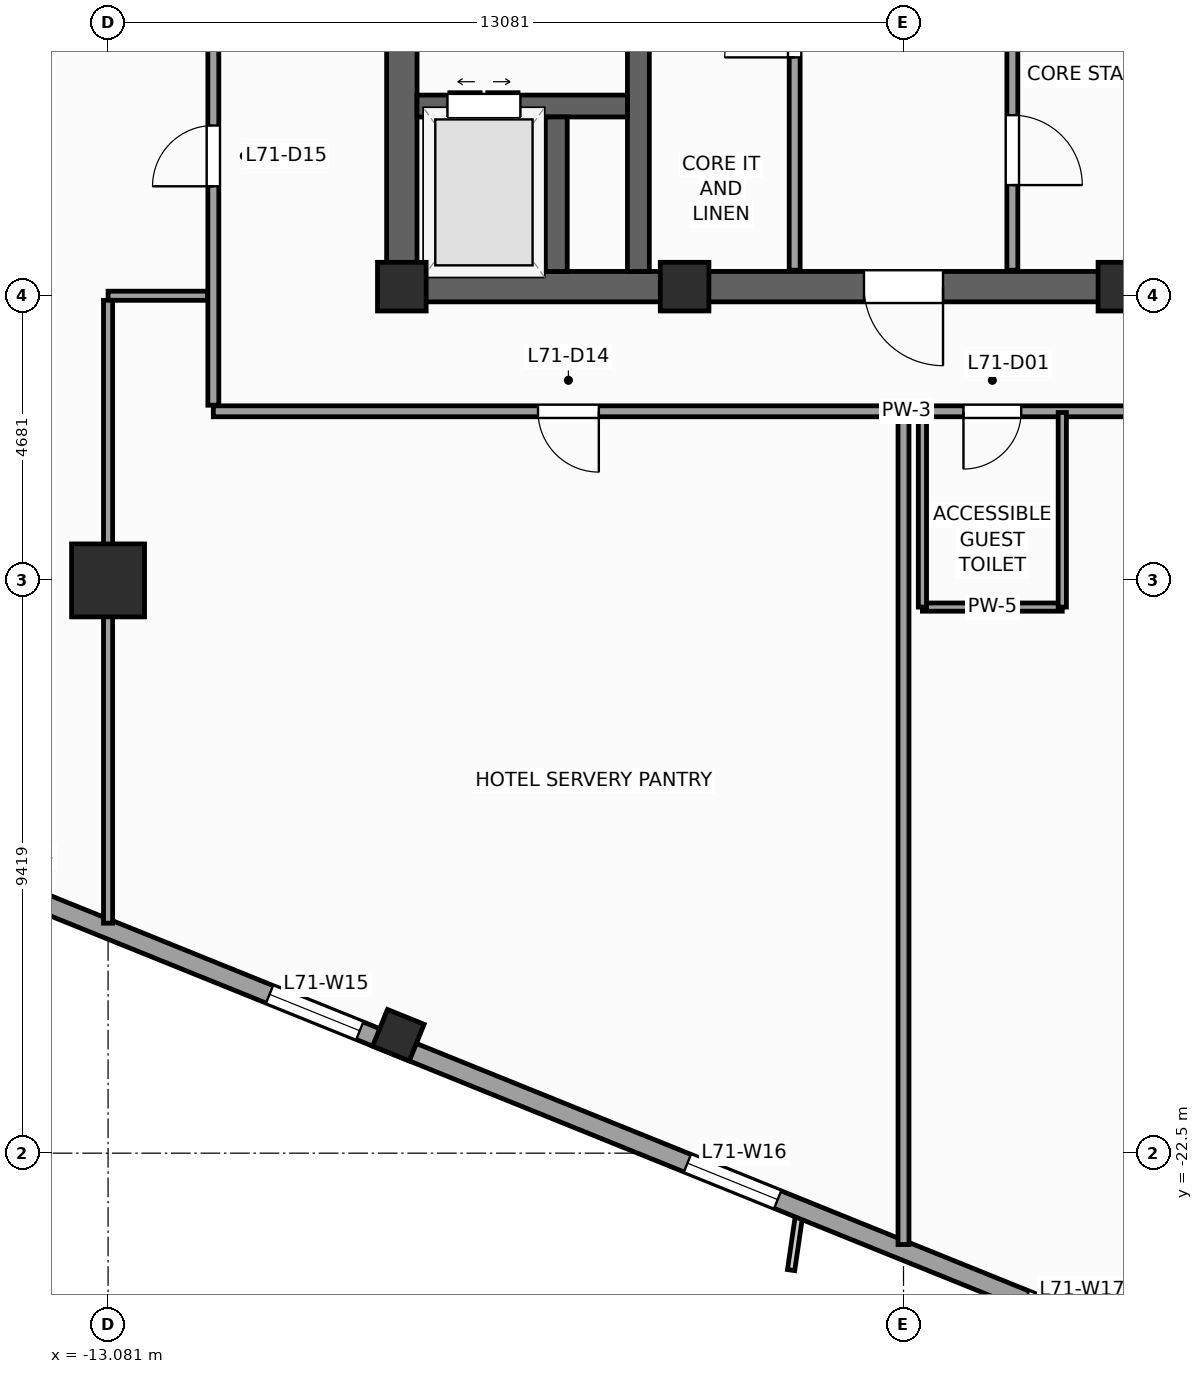
"""IFC4 building model, lengths in metres.
Left out: names, types, materials, properties, quantities, classifications, styles, units other than length and angle.
Written with IfcOpenShell. Run it as: python <this file> out.ifc"""

import sys

from ifc_helpers import new_model, si_unit, direction, frame, frame_2d, origin, origin_2d, place, context, subcontext, project, spatial, rectangle, extrude, source, transform, mapped, element, fill, save


model = new_model("IFC4")
c1 = context("Model", 3, precision=1e-05, world=origin(), true_north=direction((0.0, 1.0)))
c2 = subcontext(c1, "Body", "Model", "MODEL_VIEW")
j1 = project(units=[si_unit("LENGTHUNIT", "METRE"), si_unit("PLANEANGLEUNIT", "RADIAN")], contexts=[c1])
p1 = place(None, origin())
s1 = spatial("IfcSite", under=j1, at=p1, CompositionType="ELEMENT")
p2 = place(p1, origin())
s2 = spatial("IfcBuilding", under=s1, at=p2, CompositionType="ELEMENT")
p3 = place(p2, frame((0.0, 0.0, 290.4)))
s3 = spatial("IfcBuildingStorey", under=s2, at=p3, CompositionType="ELEMENT", Elevation=290.4)
p4 = place(p3, frame((-8.5, -8.25, 0.0), z_axis=(0.0, 0.0, 1.0), x_axis=(1.0, 0.0, 0.0)))
e1 = element("IfcWall", 1, at=p4, inside=s3, PredefinedType="SHEAR", context=c2, shape_type="SweptSolid", body=[
    extrude(rectangle(XDim=17.0, YDim=0.5, at=frame_2d((8.5, 0.0))), origin(), (0.0, 0.0, 1.0), 3.6),
])
p5 = place(p4, frame((7.85, 0.0, 0.0)))
e2 = element("IfcOpeningElement", 2, at=p5, cuts=e1, PredefinedType="OPENING", context=c2, shape_type="SweptSolid", body=[
    extrude(rectangle(XDim=1.3, YDim=2.2, at=frame_2d((0.65, 1.1))), frame((0.0, 0.26, 0.0), z_axis=(0.0, -1.0, 0.0), x_axis=(1.0, 0.0, 0.0)), (0.0, 0.0, 1.0), 0.52),
])
p6 = place(p3, frame((-8.25, -8.0, 0.0), z_axis=(0.0, 0.0, 1.0), x_axis=(0.0, 1.0, 0.0)))
e3 = element("IfcWall", 3, at=p6, inside=s3, PredefinedType="SHEAR", context=c2, shape_type="SweptSolid", body=[
    extrude(rectangle(XDim=16.0, YDim=0.5, at=frame_2d((8.0, 0.0))), origin(), (0.0, 0.0, 1.0), 3.6),
])
p7 = place(p6, frame((4.69, 0.0, 0.0)))
e4 = element("IfcOpeningElement", 4, at=p7, cuts=e3, PredefinedType="OPENING", context=c2, shape_type="SweptSolid", body=[
    extrude(rectangle(XDim=1.3, YDim=2.2, at=frame_2d((0.65, 1.1))), frame((0.0, 0.26, 0.0), z_axis=(0.0, -1.0, 0.0), x_axis=(1.0, 0.0, 0.0)), (0.0, 0.0, 1.0), 0.52),
])
p8 = place(p3, frame((-4.36, -8.0, 0.0), z_axis=(0.0, 0.0, 1.0), x_axis=(0.0, 1.0, 0.0)))
e5 = element("IfcWall", 5, at=p8, inside=s3, PredefinedType="SHEAR", context=c2, shape_type="SweptSolid", body=[
    extrude(rectangle(XDim=16.0, YDim=0.36, at=frame_2d((8.0, 0.0))), origin(), (0.0, 0.0, 1.0), 3.6),
])
p9 = place(p3, frame((-8.0, -5.28, 0.0), z_axis=(0.0, 0.0, 1.0), x_axis=(1.0, 0.0, 0.0)))
e6 = element("IfcWall", 6, at=p9, inside=s3, PredefinedType="SHEAR", context=c2, shape_type="SweptSolid", body=[
    extrude(rectangle(XDim=3.46, YDim=0.36, at=frame_2d((1.73, 0.0))), origin(), (0.0, 0.0, 1.0), 3.6),
])
p10 = place(p9, frame((0.5, 0.0, 0.0)))
e7 = element("IfcOpeningElement", 7, at=p10, cuts=e6, PredefinedType="OPENING", context=c2, shape_type="SweptSolid", body=[
    extrude(rectangle(XDim=1.2, YDim=2.25, at=frame_2d((0.6, 1.125))), frame((0.0, 0.19, 0.0), z_axis=(0.0, -1.0, 0.0), x_axis=(1.0, 0.0, 0.0)), (0.0, 0.0, 1.0), 0.38),
])
p11 = place(p3, frame((-5.71, -8.0, 0.0), z_axis=(0.0, 0.0, 1.0), x_axis=(0.0, 1.0, 0.0)))
e8 = element("IfcWall", 8, at=p11, inside=s3, PredefinedType="SHEAR", context=c2, shape_type="SweptSolid", body=[
    extrude(rectangle(XDim=2.54, YDim=0.36, at=frame_2d((1.27, 0.0))), origin(), (0.0, 0.0, 1.0), 3.6),
])
m1 = source(origin(), c2, "Body", "SweptSolid", [
    extrude(rectangle(XDim=0.8, YDim=0.8, at=origin_2d()), origin(), (0.0, 0.0, 1.0), 3.6),
])
for number, where, z_axis, x_axis in (
    (9, (-8.25, -8.25, 0.0), (0.0, 0.0, 1.0), (1.0, 0.0, 0.0)),
    (10, (-3.6, -8.25, 0.0), (0.0, 0.0, 1.0), (1.0, 0.0, 0.0)),
    (11, (3.6, -8.25, 0.0), (0.0, 0.0, 1.0), (1.0, 0.0, 0.0)),
):
    element("IfcColumn", number, at=place(p3, frame(where, z_axis=z_axis, x_axis=x_axis)), inside=s3, PredefinedType="PILASTER", context=c2, shape_type="MappedRepresentation", body=[
        mapped(m1, transform((0.0, 0.0, 0.0), scale=1.0)),
    ])
m2 = source(origin(), c2, "Body", "SweptSolid", [
    extrude(rectangle(XDim=1.2, YDim=1.2, at=origin_2d()), origin(), (0.0, 0.0, 1.0), 3.6),
])
p12 = place(p3, frame((-13.081, -13.081, 0.0), z_axis=(0.0, 0.0, 1.0), x_axis=(1.0, 0.0, 0.0)))
e12 = element("IfcColumn", 12, at=p12, inside=s3, PredefinedType="COLUMN", context=c2, shape_type="MappedRepresentation", body=[
    mapped(m2, transform((0.0, 0.0, 0.0), scale=1.0)),
])
m3 = source(origin(), c2, "Body", "SweptSolid", [
    extrude(rectangle(XDim=0.65, YDim=0.65, at=origin_2d()), origin(), (0.0, 0.0, 1.0), 3.6),
])
p13 = place(p3, frame((-8.307, -20.56, 0.0), z_axis=(0.0, 0.0, 1.0), x_axis=(0.374606593416, 0.927183854567, 0.0)))
e13 = element("IfcColumn", 13, at=p13, inside=s3, PredefinedType="COLUMN", context=c2, shape_type="MappedRepresentation", body=[
    mapped(m3, transform((0.0, 0.0, 0.0), scale=1.0)),
])
p14 = place(p3, frame((-23.813, -14.479, 0.0), z_axis=(0.0, 0.0, 1.0), x_axis=(0.927182657188, -0.374609557019, 0.0)))
e14 = element("IfcWall", 14, at=p14, inside=s3, PredefinedType="STANDARD", context=c2, shape_type="SweptSolid", body=[
    extrude(rectangle(XDim=33.31, YDim=0.31, at=frame_2d((16.655, 0.0))), origin(), (0.0, 0.0, 1.0), 2.75),
])
p15 = place(p14, frame((3.197, 0.0, 0.47)))
e15 = element("IfcOpeningElement", 15, at=p15, cuts=e14, PredefinedType="OPENING", context=c2, shape_type="SweptSolid", body=[
    extrude(rectangle(XDim=1.6, YDim=2.1, at=frame_2d((0.8, 1.05))), frame((0.0, 0.165, 0.0), z_axis=(0.0, -1.0, 0.0), x_axis=(1.0, 0.0, 0.0)), (0.0, 0.0, 1.0), 0.33),
])
p16 = place(p14, frame((8.86, 0.0, 0.47)))
e16 = element("IfcOpeningElement", 16, at=p16, cuts=e14, PredefinedType="OPENING", context=c2, shape_type="SweptSolid", body=[
    extrude(rectangle(XDim=1.6, YDim=2.1, at=frame_2d((0.8, 1.05))), frame((0.0, 0.165, 0.0), z_axis=(0.0, -1.0, 0.0), x_axis=(1.0, 0.0, 0.0)), (0.0, 0.0, 1.0), 0.33),
])
p17 = place(p14, frame((14.439, 0.0, 0.47)))
e17 = element("IfcOpeningElement", 17, at=p17, cuts=e14, PredefinedType="OPENING", context=c2, shape_type="SweptSolid", body=[
    extrude(rectangle(XDim=1.6, YDim=2.1, at=frame_2d((0.8, 1.05))), frame((0.0, 0.165, 0.0), z_axis=(0.0, -1.0, 0.0), x_axis=(1.0, 0.0, 0.0)), (0.0, 0.0, 1.0), 0.33),
])
p18 = place(p14, frame((21.851, 0.0, 0.47)))
e18 = element("IfcOpeningElement", 18, at=p18, cuts=e14, PredefinedType="OPENING", context=c2, shape_type="SweptSolid", body=[
    extrude(rectangle(XDim=1.6, YDim=2.1, at=frame_2d((0.8, 1.05))), frame((0.0, 0.165, 0.0), z_axis=(0.0, -1.0, 0.0), x_axis=(1.0, 0.0, 0.0)), (0.0, 0.0, 1.0), 0.33),
])
p19 = place(p14, frame((27.847, 0.0, 0.47)))
e19 = element("IfcOpeningElement", 19, at=p19, cuts=e14, PredefinedType="OPENING", context=c2, shape_type="SweptSolid", body=[
    extrude(rectangle(XDim=1.6, YDim=2.1, at=frame_2d((0.8, 1.05))), frame((0.0, 0.165, 0.0), z_axis=(0.0, -1.0, 0.0), x_axis=(1.0, 0.0, 0.0)), (0.0, 0.0, 1.0), 0.33),
])
p20 = place(p3, frame((-1.79, -7.98, 0.0), z_axis=(0.0, 0.0, 1.0), x_axis=(0.0, 1.0, 0.0)))
e20 = element("IfcWall", 20, at=p20, inside=s3, PredefinedType="PARTITIONING", context=c2, shape_type="SweptSolid", body=[
    extrude(rectangle(XDim=12.38, YDim=0.18, at=frame_2d((6.19, 0.0))), origin(), (0.0, 0.0, 1.0), 3.35),
])
p21 = place(p20, frame((8.8, 0.0, 0.0)))
e21 = element("IfcOpeningElement", 21, at=p21, cuts=e20, PredefinedType="OPENING", context=c2, shape_type="SweptSolid", body=[
    extrude(rectangle(XDim=1.1, YDim=2.2, at=frame_2d((0.55, 1.1))), frame((0.0, 0.1, 0.0), z_axis=(0.0, -1.0, 0.0), x_axis=(1.0, 0.0, 0.0)), (0.0, 0.0, 1.0), 0.2),
])
p22 = place(p20, frame((10.86, 0.0, 0.0)))
e22 = element("IfcOpeningElement", 22, at=p22, cuts=e20, PredefinedType="OPENING", context=c2, shape_type="SweptSolid", body=[
    extrude(rectangle(XDim=1.1, YDim=2.2, at=frame_2d((0.55, 1.1))), frame((0.0, 0.1, 0.0), z_axis=(0.0, -1.0, 0.0), x_axis=(1.0, 0.0, 0.0)), (0.0, 0.0, 1.0), 0.2),
])
p23 = place(p20, frame((3.5, 0.0, 0.0)))
e23 = element("IfcOpeningElement", 23, at=p23, cuts=e20, PredefinedType="OPENING", context=c2, shape_type="SweptSolid", body=[
    extrude(rectangle(XDim=1.15, YDim=2.25, at=frame_2d((0.575, 1.125))), frame((0.0, 0.1, 0.0), z_axis=(0.0, -1.0, 0.0), x_axis=(1.0, 0.0, 0.0)), (0.0, 0.0, 1.0), 0.2),
])
p24 = place(p3, frame((1.79, -7.98, 0.0), z_axis=(0.0, 0.0, 1.0), x_axis=(0.0, 1.0, 0.0)))
e24 = element("IfcWall", 24, at=p24, inside=s3, PredefinedType="PARTITIONING", context=c2, shape_type="SweptSolid", body=[
    extrude(rectangle(XDim=12.38, YDim=0.18, at=frame_2d((6.19, 0.0))), origin(), (0.0, 0.0, 1.0), 3.35),
])
p25 = place(p24, frame((8.8, 0.0, 0.0)))
e25 = element("IfcOpeningElement", 25, at=p25, cuts=e24, PredefinedType="OPENING", context=c2, shape_type="SweptSolid", body=[
    extrude(rectangle(XDim=1.1, YDim=2.2, at=frame_2d((0.55, 1.1))), frame((0.0, 0.1, 0.0), z_axis=(0.0, -1.0, 0.0), x_axis=(1.0, 0.0, 0.0)), (0.0, 0.0, 1.0), 0.2),
])
p26 = place(p24, frame((10.86, 0.0, 0.0)))
e26 = element("IfcOpeningElement", 26, at=p26, cuts=e24, PredefinedType="OPENING", context=c2, shape_type="SweptSolid", body=[
    extrude(rectangle(XDim=1.1, YDim=2.2, at=frame_2d((0.55, 1.1))), frame((0.0, 0.1, 0.0), z_axis=(0.0, -1.0, 0.0), x_axis=(1.0, 0.0, 0.0)), (0.0, 0.0, 1.0), 0.2),
])
p27 = place(p24, frame((1.4, 0.0, 0.0)))
e27 = element("IfcOpeningElement", 27, at=p27, cuts=e24, PredefinedType="OPENING", context=c2, shape_type="SweptSolid", body=[
    extrude(rectangle(XDim=1.15, YDim=2.25, at=frame_2d((0.575, 1.125))), frame((0.0, 0.1, 0.0), z_axis=(0.0, -1.0, 0.0), x_axis=(1.0, 0.0, 0.0)), (0.0, 0.0, 1.0), 0.2),
])
p28 = place(p24, frame((5.6, 0.0, 0.0)))
e28 = element("IfcOpeningElement", 28, at=p28, cuts=e24, PredefinedType="OPENING", context=c2, shape_type="SweptSolid", body=[
    extrude(rectangle(XDim=1.15, YDim=2.25, at=frame_2d((0.575, 1.125))), frame((0.0, 0.1, 0.0), z_axis=(0.0, -1.0, 0.0), x_axis=(1.0, 0.0, 0.0)), (0.0, 0.0, 1.0), 0.2),
])
p29 = place(p3, frame((-11.35, -10.3, 0.0), z_axis=(0.0, 0.0, 1.0), x_axis=(1.0, 0.0, 0.0)))
e29 = element("IfcWall", 29, at=p29, inside=s3, PredefinedType="PARTITIONING", context=c2, shape_type="SweptSolid", body=[
    extrude(rectangle(XDim=22.8, YDim=0.18, at=frame_2d((11.4, 0.0))), origin(), (0.0, 0.0, 1.0), 3.35),
])
p30 = place(p29, frame((12.336, 0.0, 0.0)))
e30 = element("IfcOpeningElement", 30, at=p30, cuts=e29, PredefinedType="OPENING", context=c2, shape_type="SweptSolid", body=[
    extrude(rectangle(XDim=0.95, YDim=2.1, at=frame_2d((0.475, 1.05))), frame((0.0, 0.1, 0.0), z_axis=(0.0, -1.0, 0.0), x_axis=(1.0, 0.0, 0.0)), (0.0, 0.0, 1.0), 0.2),
])
p31 = place(p29, frame((17.71, 0.0, 0.0)))
e31 = element("IfcOpeningElement", 31, at=p31, cuts=e29, PredefinedType="OPENING", context=c2, shape_type="SweptSolid", body=[
    extrude(rectangle(XDim=1.0, YDim=2.15, at=frame_2d((0.5, 1.075))), frame((0.0, 0.1, 0.0), z_axis=(0.0, -1.0, 0.0), x_axis=(1.0, 0.0, 0.0)), (0.0, 0.0, 1.0), 0.2),
])
p32 = place(p29, frame((5.339, 0.0, 0.0)))
e32 = element("IfcOpeningElement", 32, at=p32, cuts=e29, PredefinedType="OPENING", context=c2, shape_type="SweptSolid", body=[
    extrude(rectangle(XDim=1.0, YDim=2.15, at=frame_2d((0.5, 1.075))), frame((0.0, 0.1, 0.0), z_axis=(0.0, -1.0, 0.0), x_axis=(1.0, 0.0, 0.0)), (0.0, 0.0, 1.0), 0.2),
])
p33 = place(p3, frame((-11.35, -10.2, 0.0), z_axis=(0.0, 0.0, 1.0), x_axis=(0.0, 1.0, 0.0)))
e33 = element("IfcWall", 33, at=p33, inside=s3, PredefinedType="PARTITIONING", context=c2, shape_type="SweptSolid", body=[
    extrude(rectangle(XDim=22.55, YDim=0.18, at=frame_2d((11.275, 0.0))), origin(), (0.0, 0.0, 1.0), 3.35),
])
p34 = place(p33, frame((11.6, 0.0, 0.0)))
e34 = element("IfcOpeningElement", 34, at=p34, cuts=e33, PredefinedType="OPENING", context=c2, shape_type="SweptSolid", body=[
    extrude(rectangle(XDim=1.0, YDim=2.15, at=frame_2d((0.5, 1.075))), frame((0.0, 0.1, 0.0), z_axis=(0.0, -1.0, 0.0), x_axis=(1.0, 0.0, 0.0)), (0.0, 0.0, 1.0), 0.2),
])
p35 = place(p33, frame((15.8, 0.0, 0.0)))
e35 = element("IfcOpeningElement", 35, at=p35, cuts=e33, PredefinedType="OPENING", context=c2, shape_type="SweptSolid", body=[
    extrude(rectangle(XDim=1.0, YDim=2.15, at=frame_2d((0.5, 1.075))), frame((0.0, 0.1, 0.0), z_axis=(0.0, -1.0, 0.0), x_axis=(1.0, 0.0, 0.0)), (0.0, 0.0, 1.0), 0.2),
])
p36 = place(p33, frame((3.6, 0.0, 0.0)))
e36 = element("IfcOpeningElement", 36, at=p36, cuts=e33, PredefinedType="OPENING", context=c2, shape_type="SweptSolid", body=[
    extrude(rectangle(XDim=1.0, YDim=2.15, at=frame_2d((0.5, 1.075))), frame((0.0, 0.1, 0.0), z_axis=(0.0, -1.0, 0.0), x_axis=(1.0, 0.0, 0.0)), (0.0, 0.0, 1.0), 0.2),
])
p37 = place(p33, frame((7.8, 0.0, 0.0)))
e37 = element("IfcOpeningElement", 37, at=p37, cuts=e33, PredefinedType="OPENING", context=c2, shape_type="SweptSolid", body=[
    extrude(rectangle(XDim=1.0, YDim=2.15, at=frame_2d((0.5, 1.075))), frame((0.0, 0.1, 0.0), z_axis=(0.0, -1.0, 0.0), x_axis=(1.0, 0.0, 0.0)), (0.0, 0.0, 1.0), 0.2),
])
p38 = place(p3, frame((0.0, -10.395, 0.0), z_axis=(0.0, 0.0, 1.0), x_axis=(0.0, -1.0, 0.0)))
e38 = element("IfcWall", 38, at=p38, inside=s3, PredefinedType="PARTITIONING", context=c2, shape_type="SweptSolid", body=[
    extrude(rectangle(XDim=13.608, YDim=0.18, at=frame_2d((6.804, 0.0))), origin(), (0.0, 0.0, 1.0), 3.35),
])
p39 = place(p3, frame((-11.445, -8.4, 0.0), z_axis=(0.0, 0.0, 1.0), x_axis=(-1.0, 0.0, 0.0)))
e39 = element("IfcWall", 39, at=p39, inside=s3, PredefinedType="PARTITIONING", context=c2, shape_type="SweptSolid", body=[
    extrude(rectangle(XDim=1.636, YDim=0.15, at=frame_2d((0.818, 0.0))), origin(), (0.0, 0.0, 1.0), 3.35),
])
p40 = place(p3, frame((-13.081, -8.475, 0.0), z_axis=(0.0, 0.0, 1.0), x_axis=(0.0, -1.0, 0.0)))
e40 = element("IfcWall", 40, at=p40, inside=s3, PredefinedType="PARTITIONING", context=c2, shape_type="SweptSolid", body=[
    extrude(rectangle(XDim=10.243, YDim=0.15, at=frame_2d((5.121, 0.0))), origin(), (0.0, 0.0, 1.0), 2.45),
])
p41 = place(p3, frame((0.311, -13.52, 0.0), z_axis=(0.0, 0.0, 1.0), x_axis=(1.0, 0.0, 0.0)))
e41 = element("IfcWall", 41, at=p41, inside=s3, PredefinedType="PARTITIONING", context=c2, shape_type="SweptSolid", body=[
    extrude(rectangle(XDim=2.3, YDim=0.135, at=frame_2d((1.15, 0.0))), origin(), (0.0, 0.0, 1.0), 3.35),
])
for number, where, z_axis, x_axis in (
    (42, (2.611, -13.52, 0.0), (0.0, 0.0, 1.0), (0.0, 1.0, 0.0)),
    (43, (0.311, -13.52, 0.0), (0.0, 0.0, 1.0), (0.0, 1.0, 0.0)),
):
    element("IfcWall", number, at=place(p3, frame(where, z_axis=z_axis, x_axis=x_axis)), inside=s3, PredefinedType="PARTITIONING", context=c2, shape_type="SweptSolid", body=[
        extrude(rectangle(XDim=3.2, YDim=0.135, at=frame_2d((1.6, 0.0))), origin(), (0.0, 0.0, 1.0), 3.35),
    ])
m4 = source(origin(), c2, "Body", "SweptSolid", [
    extrude(rectangle(XDim=1.6, YDim=2.1, at=frame_2d((0.8, 1.05))), frame((0.0, 0.03, 0.0), z_axis=(0.0, -1.0, 0.0), x_axis=(1.0, 0.0, 0.0)), (0.0, 0.0, 1.0), 0.06),
])
p42 = place(p17, origin())
e44 = element("IfcWindow", 44, at=p42, inside=s3, PartitioningType="SINGLE_PANEL", PredefinedType="WINDOW", context=c2, shape_type="MappedRepresentation", body=[
    mapped(m4, transform((0.0, 0.0, 0.0), scale=1.0)),
])
fill(e17, e44)
p43 = place(p18, origin())
e45 = element("IfcWindow", 45, at=p43, inside=s3, PartitioningType="SINGLE_PANEL", PredefinedType="WINDOW", context=c2, shape_type="MappedRepresentation", body=[
    mapped(m4, transform((0.0, 0.0, 0.0), scale=1.0)),
])
fill(e18, e45)
m5 = source(origin(), c2, "Body", "SweptSolid", [
    extrude(rectangle(XDim=1.3, YDim=2.2, at=frame_2d((0.65, 1.1))), frame((0.0, 0.025, 0.0), z_axis=(0.0, -1.0, 0.0), x_axis=(1.0, 0.0, 0.0)), (0.0, 0.0, 1.0), 0.05),
])
p44 = place(p5, frame((1.3, 0.0, 0.0), z_axis=(0.0, 0.0, 1.0), x_axis=(-1.0, 0.0, 0.0)))
e46 = element("IfcDoor", 46, at=p44, inside=s3, OperationType="SINGLE_SWING_RIGHT", PredefinedType="DOOR", context=c2, shape_type="MappedRepresentation", body=[
    mapped(m5, transform((0.0, 0.0, 0.0), scale=1.0)),
])
fill(e2, e46)
m6 = source(origin(), c2, "Body", "SweptSolid", [
    extrude(rectangle(XDim=1.2, YDim=2.25, at=frame_2d((0.6, 1.125))), frame((0.0, 0.025, 0.0), z_axis=(0.0, -1.0, 0.0), x_axis=(1.0, 0.0, 0.0)), (0.0, 0.0, 1.0), 0.05),
])
p45 = place(p10, origin())
e47 = element("IfcDoor", 47, at=p45, inside=s3, OperationType="DOUBLE_DOOR_SLIDING", PredefinedType="DOOR", context=c2, shape_type="MappedRepresentation", body=[
    mapped(m6, transform((0.0, 0.0, 0.0), scale=1.0)),
])
fill(e7, e47)
m7 = source(origin(), c2, "Body", "SweptSolid", [
    extrude(rectangle(XDim=1.15, YDim=2.25, at=frame_2d((0.575, 1.125))), frame((0.0, 0.025, 0.0), z_axis=(0.0, -1.0, 0.0), x_axis=(1.0, 0.0, 0.0)), (0.0, 0.0, 1.0), 0.05),
])
p46 = place(p23, origin())
e48 = element("IfcDoor", 48, at=p46, inside=s3, OperationType="SINGLE_SWING_LEFT", PredefinedType="DOOR", context=c2, shape_type="MappedRepresentation", body=[
    mapped(m7, transform((0.0, 0.0, 0.0), scale=1.0)),
])
fill(e23, e48)
p47 = place(p27, frame((1.15, 0.0, 0.0), z_axis=(0.0, 0.0, 1.0), x_axis=(-1.0, 0.0, 0.0)))
e49 = element("IfcDoor", 49, at=p47, inside=s3, OperationType="SINGLE_SWING_LEFT", PredefinedType="DOOR", context=c2, shape_type="MappedRepresentation", body=[
    mapped(m7, transform((0.0, 0.0, 0.0), scale=1.0)),
])
fill(e27, e49)
m8 = source(origin(), c2, "Body", "SweptSolid", [
    extrude(rectangle(XDim=0.95, YDim=2.1, at=frame_2d((0.475, 1.05))), frame((0.0, 0.025, 0.0), z_axis=(0.0, -1.0, 0.0), x_axis=(1.0, 0.0, 0.0)), (0.0, 0.0, 1.0), 0.05),
])
p48 = place(p30, frame((0.95, 0.0, 0.0), z_axis=(0.0, 0.0, 1.0), x_axis=(-1.0, 0.0, 0.0)))
e50 = element("IfcDoor", 50, at=p48, inside=s3, OperationType="SINGLE_SWING_LEFT", PredefinedType="DOOR", context=c2, shape_type="MappedRepresentation", body=[
    mapped(m8, transform((0.0, 0.0, 0.0), scale=1.0)),
])
fill(e30, e50)
m9 = source(origin(), c2, "Body", "SweptSolid", [
    extrude(rectangle(XDim=1.0, YDim=2.15, at=frame_2d((0.5, 1.075))), frame((0.0, 0.025, 0.0), z_axis=(0.0, -1.0, 0.0), x_axis=(1.0, 0.0, 0.0)), (0.0, 0.0, 1.0), 0.05),
])
p49 = place(p32, frame((1.0, 0.0, 0.0), z_axis=(0.0, 0.0, 1.0), x_axis=(-1.0, 0.0, 0.0)))
e51 = element("IfcDoor", 51, at=p49, inside=s3, OperationType="SINGLE_SWING_RIGHT", PredefinedType="DOOR", context=c2, shape_type="MappedRepresentation", body=[
    mapped(m9, transform((0.0, 0.0, 0.0), scale=1.0)),
])
fill(e32, e51)
p50 = place(p36, origin())
e52 = element("IfcDoor", 52, at=p50, inside=s3, OperationType="SINGLE_SWING_LEFT", PredefinedType="DOOR", context=c2, shape_type="MappedRepresentation", body=[
    mapped(m9, transform((0.0, 0.0, 0.0), scale=1.0)),
])
fill(e36, e52)
save(model, sys.argv[1])
